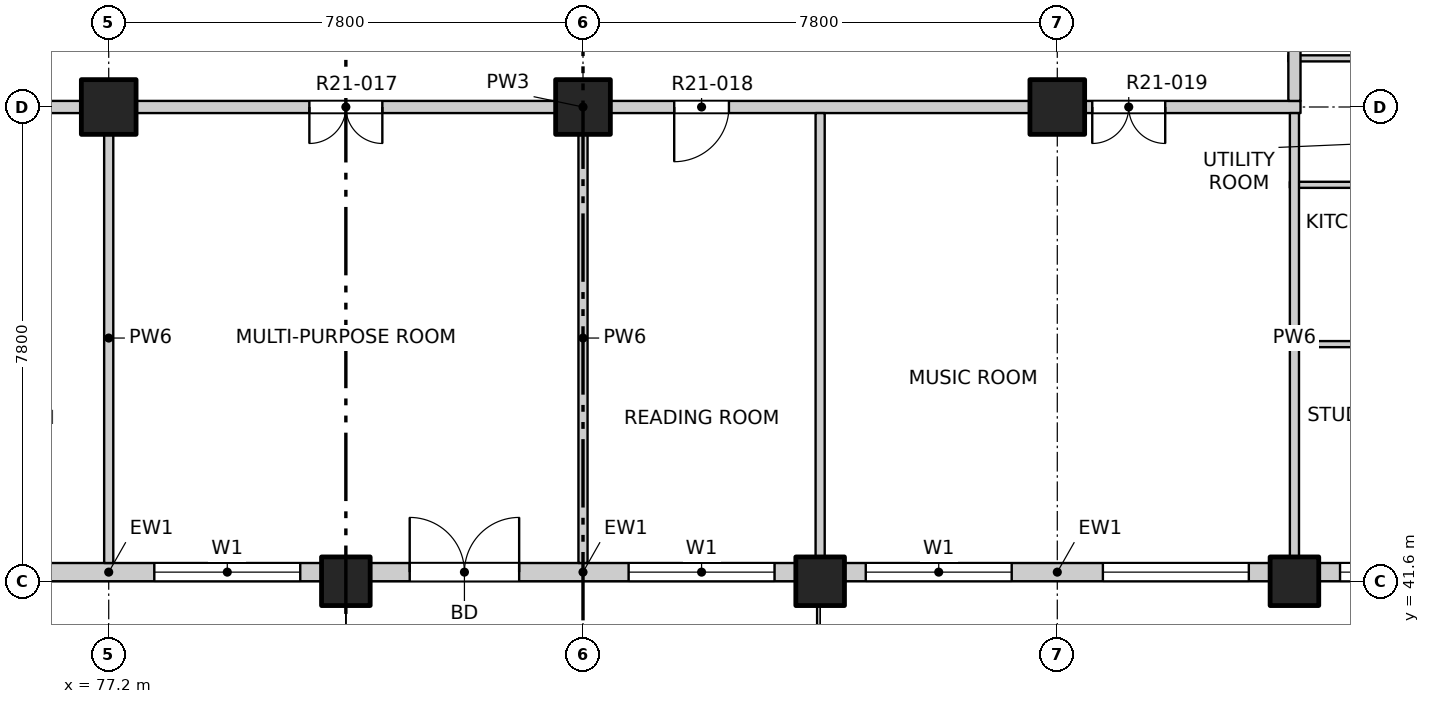
"""IFC4 building model, lengths in metres.
Left out: names, types, materials, properties, quantities, classifications, styles, units other than length and angle.
Written with IfcOpenShell. Run it as: python <this file> out.ifc"""

import sys

from ifc_helpers import new_model, si_unit, direction, frame, frame_2d, origin, origin_2d, place, context, subcontext, project, spatial, rectangle, extrude, element, fill, save


model = new_model("IFC4")
c1 = context("Model", 3, precision=1e-05, world=origin(), true_north=direction((0.0, 1.0)))
c2 = subcontext(c1, "Body", "Model", "MODEL_VIEW")
j1 = project(units=[si_unit("LENGTHUNIT", "METRE"), si_unit("PLANEANGLEUNIT", "RADIAN")], contexts=[c1])
p1 = place(None, origin())
s1 = spatial("IfcSite", under=j1, at=p1, CompositionType="ELEMENT")
p2 = place(p1, origin())
s2 = spatial("IfcBuilding", under=s1, at=p2, CompositionType="ELEMENT")
p3 = place(p2, frame((0.0, 0.0, 214.3)))
s3 = spatial("IfcBuildingStorey", under=s2, at=p3, CompositionType="ELEMENT", Elevation=214.3)
for number, where, z_axis, x_axis in (
    (1, (81.1, 41.6, -0.25), (0.0, 0.0, 1.0), (1.0, 0.0, 0.0)),
    (2, (88.9, 41.6, -0.25), (0.0, 0.0, 1.0), (1.0, 0.0, 0.0)),
    (3, (96.7, 41.6, -0.25), (0.0, 0.0, 1.0), (1.0, 0.0, 0.0)),
):
    element("IfcColumn", number, at=place(p3, frame(where, z_axis=z_axis, x_axis=x_axis)), inside=s3, PredefinedType="COLUMN", context=c2, shape_type="SweptSolid", body=[
        extrude(rectangle(XDim=0.8, YDim=0.8, at=origin_2d()), origin(), (0.0, 0.0, 1.0), 3.4),
    ])
for number, where, z_axis, x_axis in (
    (4, (77.2, 49.4, -0.25), (0.0, 0.0, 1.0), (1.0, 0.0, 0.0)),
    (5, (85.0, 49.4, -0.25), (0.0, 0.0, 1.0), (1.0, 0.0, 0.0)),
    (6, (92.8, 49.4, -0.25), (0.0, 0.0, 1.0), (1.0, 0.0, 0.0)),
):
    element("IfcColumn", number, at=place(p3, frame(where, z_axis=z_axis, x_axis=x_axis)), inside=s3, PredefinedType="COLUMN", context=c2, shape_type="SweptSolid", body=[
        extrude(rectangle(XDim=0.9, YDim=0.9, at=origin_2d()), origin(), (0.0, 0.0, 1.0), 3.4),
    ])
p4 = place(p3, frame((73.7, 41.75, 0.0), z_axis=(0.0, 0.0, 1.0), x_axis=(1.0, 0.0, 0.0)))
e7 = element("IfcWall", 7, at=p4, inside=s3, PredefinedType="SOLIDWALL", context=c2, shape_type="SweptSolid", body=[
    extrude(rectangle(XDim=7.0, YDim=0.3, at=frame_2d((3.5, 0.0))), origin(), (0.0, 0.0, 1.0), 2.7),
])
p5 = place(p4, frame((0.65, 0.0, 0.0)))
e8 = element("IfcOpeningElement", 8, at=p5, cuts=e7, PredefinedType="OPENING", context=c2, shape_type="SweptSolid", body=[
    extrude(rectangle(XDim=1.8, YDim=2.4, at=frame_2d((0.9, 1.2))), frame((0.0, 0.16, 0.0), z_axis=(0.0, -1.0, 0.0), x_axis=(1.0, 0.0, 0.0)), (0.0, 0.0, 1.0), 0.32),
])
p6 = place(p4, frame((4.25, 0.0, 0.9)))
e9 = element("IfcOpeningElement", 9, at=p6, cuts=e7, PredefinedType="OPENING", context=c2, shape_type="SweptSolid", body=[
    extrude(rectangle(XDim=2.4, YDim=1.8, at=frame_2d((1.2, 0.9))), frame((0.0, 0.16, 0.0), z_axis=(0.0, -1.0, 0.0), x_axis=(1.0, 0.0, 0.0)), (0.0, 0.0, 1.0), 0.32),
])
p7 = place(p3, frame((81.5, 41.75, 0.0), z_axis=(0.0, 0.0, 1.0), x_axis=(1.0, 0.0, 0.0)))
e10 = element("IfcWall", 10, at=p7, inside=s3, PredefinedType="SOLIDWALL", context=c2, shape_type="SweptSolid", body=[
    extrude(rectangle(XDim=7.0, YDim=0.3, at=frame_2d((3.5, 0.0))), origin(), (0.0, 0.0, 1.0), 2.7),
])
p8 = place(p7, frame((0.65, 0.0, 0.0)))
e11 = element("IfcOpeningElement", 11, at=p8, cuts=e10, PredefinedType="OPENING", context=c2, shape_type="SweptSolid", body=[
    extrude(rectangle(XDim=1.8, YDim=2.4, at=frame_2d((0.9, 1.2))), frame((0.0, 0.16, 0.0), z_axis=(0.0, -1.0, 0.0), x_axis=(1.0, 0.0, 0.0)), (0.0, 0.0, 1.0), 0.32),
])
p9 = place(p7, frame((4.25, 0.0, 0.9)))
e12 = element("IfcOpeningElement", 12, at=p9, cuts=e10, PredefinedType="OPENING", context=c2, shape_type="SweptSolid", body=[
    extrude(rectangle(XDim=2.4, YDim=1.8, at=frame_2d((1.2, 0.9))), frame((0.0, 0.16, 0.0), z_axis=(0.0, -1.0, 0.0), x_axis=(1.0, 0.0, 0.0)), (0.0, 0.0, 1.0), 0.32),
])
p10 = place(p3, frame((89.3, 41.75, 0.0), z_axis=(0.0, 0.0, 1.0), x_axis=(1.0, 0.0, 0.0)))
e13 = element("IfcWall", 13, at=p10, inside=s3, PredefinedType="SOLIDWALL", context=c2, shape_type="SweptSolid", body=[
    extrude(rectangle(XDim=7.0, YDim=0.3, at=frame_2d((3.5, 0.0))), origin(), (0.0, 0.0, 1.0), 2.7),
])
p11 = place(p10, frame((0.35, 0.0, 0.9)))
e14 = element("IfcOpeningElement", 14, at=p11, cuts=e13, PredefinedType="OPENING", context=c2, shape_type="SweptSolid", body=[
    extrude(rectangle(XDim=2.4, YDim=1.8, at=frame_2d((1.2, 0.9))), frame((0.0, 0.16, 0.0), z_axis=(0.0, -1.0, 0.0), x_axis=(1.0, 0.0, 0.0)), (0.0, 0.0, 1.0), 0.32),
])
p12 = place(p10, frame((4.25, 0.0, 0.9)))
e15 = element("IfcOpeningElement", 15, at=p12, cuts=e13, PredefinedType="OPENING", context=c2, shape_type="SweptSolid", body=[
    extrude(rectangle(XDim=2.4, YDim=1.8, at=frame_2d((1.2, 0.9))), frame((0.0, 0.16, 0.0), z_axis=(0.0, -1.0, 0.0), x_axis=(1.0, 0.0, 0.0)), (0.0, 0.0, 1.0), 0.32),
])
p13 = place(p3, frame((97.1, 41.75, 0.0), z_axis=(0.0, 0.0, 1.0), x_axis=(1.0, 0.0, 0.0)))
e16 = element("IfcWall", 16, at=p13, inside=s3, PredefinedType="SOLIDWALL", context=c2, shape_type="SweptSolid", body=[
    extrude(rectangle(XDim=7.4, YDim=0.3, at=frame_2d((3.7, 0.0))), origin(), (0.0, 0.0, 1.0), 2.7),
])
p14 = place(p13, frame((0.35, 0.0, 0.9)))
e17 = element("IfcOpeningElement", 17, at=p14, cuts=e16, PredefinedType="OPENING", context=c2, shape_type="SweptSolid", body=[
    extrude(rectangle(XDim=2.4, YDim=1.8, at=frame_2d((1.2, 0.9))), frame((0.0, 0.16, 0.0), z_axis=(0.0, -1.0, 0.0), x_axis=(1.0, 0.0, 0.0)), (0.0, 0.0, 1.0), 0.32),
])
p15 = place(p13, frame((4.25, 0.0, 0.9)))
e18 = element("IfcOpeningElement", 18, at=p15, cuts=e16, PredefinedType="OPENING", context=c2, shape_type="SweptSolid", body=[
    extrude(rectangle(XDim=2.4, YDim=1.8, at=frame_2d((1.2, 0.9))), frame((0.0, 0.16, 0.0), z_axis=(0.0, -1.0, 0.0), x_axis=(1.0, 0.0, 0.0)), (0.0, 0.0, 1.0), 0.32),
])
p16 = place(p3, frame((96.625, 45.5, 0.0), z_axis=(0.0, 0.0, 1.0), x_axis=(1.0, 0.0, 0.0)))
e19 = element("IfcWall", 19, at=p16, inside=s3, PredefinedType="PARTITIONING", context=c2, shape_type="SweptSolid", body=[
    extrude(rectangle(XDim=11.475, YDim=0.1, at=frame_2d((5.738, 0.0))), origin(), (0.0, 0.0, 1.0), 3.15),
])
p17 = place(p16, frame((2.61, 0.0, 0.0)))
e20 = element("IfcOpeningElement", 20, at=p17, cuts=e19, PredefinedType="OPENING", context=c2, shape_type="SweptSolid", body=[
    extrude(rectangle(XDim=0.9, YDim=2.1, at=frame_2d((0.45, 1.05))), frame((0.0, 0.06, 0.0), z_axis=(0.0, -1.0, 0.0), x_axis=(1.0, 0.0, 0.0)), (0.0, 0.0, 1.0), 0.12),
])
p18 = place(p3, frame((96.625, 48.12, 0.0), z_axis=(0.0, 0.0, 1.0), x_axis=(1.0, 0.0, 0.0)))
e21 = element("IfcWall", 21, at=p18, inside=s3, PredefinedType="PARTITIONING", context=c2, shape_type="SweptSolid", body=[
    extrude(rectangle(XDim=2.195, YDim=0.1, at=frame_2d((1.098, 0.0))), origin(), (0.0, 0.0, 1.0), 3.15),
])
p19 = place(p3, frame((73.2, 49.4, 0.0), z_axis=(0.0, 0.0, 1.0), x_axis=(1.0, 0.0, 0.0)))
e22 = element("IfcWall", 22, at=p19, inside=s3, PredefinedType="PARTITIONING", context=c2, shape_type="SweptSolid", body=[
    extrude(rectangle(XDim=23.6, YDim=0.2, at=frame_2d((11.8, 0.0))), origin(), (0.0, 0.0, 1.0), 3.15),
])
p20 = place(p19, frame((1.6, 0.0, 0.0)))
e23 = element("IfcOpeningElement", 23, at=p20, cuts=e22, PredefinedType="OPENING", context=c2, shape_type="SweptSolid", body=[
    extrude(rectangle(XDim=0.9, YDim=2.1, at=frame_2d((0.45, 1.05))), frame((0.0, 0.11, 0.0), z_axis=(0.0, -1.0, 0.0), x_axis=(1.0, 0.0, 0.0)), (0.0, 0.0, 1.0), 0.22),
])
p21 = place(p19, frame((7.3, 0.0, 0.0)))
e24 = element("IfcOpeningElement", 24, at=p21, cuts=e22, PredefinedType="OPENING", context=c2, shape_type="SweptSolid", body=[
    extrude(rectangle(XDim=1.2, YDim=2.1, at=frame_2d((0.6, 1.05))), frame((0.0, 0.11, 0.0), z_axis=(0.0, -1.0, 0.0), x_axis=(1.0, 0.0, 0.0)), (0.0, 0.0, 1.0), 0.22),
])
p22 = place(p19, frame((13.3, 0.0, 0.0)))
e25 = element("IfcOpeningElement", 25, at=p22, cuts=e22, PredefinedType="OPENING", context=c2, shape_type="SweptSolid", body=[
    extrude(rectangle(XDim=0.9, YDim=2.1, at=frame_2d((0.45, 1.05))), frame((0.0, 0.11, 0.0), z_axis=(0.0, -1.0, 0.0), x_axis=(1.0, 0.0, 0.0)), (0.0, 0.0, 1.0), 0.22),
])
p23 = place(p19, frame((20.175, 0.0, 0.0)))
e26 = element("IfcOpeningElement", 26, at=p23, cuts=e22, PredefinedType="OPENING", context=c2, shape_type="SweptSolid", body=[
    extrude(rectangle(XDim=1.2, YDim=2.1, at=frame_2d((0.6, 1.05))), frame((0.0, 0.11, 0.0), z_axis=(0.0, -1.0, 0.0), x_axis=(1.0, 0.0, 0.0)), (0.0, 0.0, 1.0), 0.22),
])
p24 = place(p3, frame((96.6, 50.2, 0.0), z_axis=(0.0, 0.0, 1.0), x_axis=(1.0, 0.0, 0.0)))
e27 = element("IfcWall", 27, at=p24, inside=s3, PredefinedType="PARTITIONING", context=c2, shape_type="SweptSolid", body=[
    extrude(rectangle(XDim=2.22, YDim=0.1, at=frame_2d((1.11, 0.0))), origin(), (0.0, 0.0, 1.0), 3.15),
])
for number, where, z_axis, x_axis in (
    (28, (77.2, 41.9, 0.0), (0.0, 0.0, 1.0), (0.0, 1.0, 0.0)),
    (29, (85.0, 41.9, 0.0), (0.0, 0.0, 1.0), (0.0, 1.0, 0.0)),
):
    element("IfcWall", number, at=place(p3, frame(where, z_axis=z_axis, x_axis=x_axis)), inside=s3, PredefinedType="PARTITIONING", context=c2, shape_type="SweptSolid", body=[
        extrude(rectangle(XDim=7.4, YDim=0.15, at=frame_2d((3.7, 0.0))), origin(), (0.0, 0.0, 1.0), 3.15),
    ])
p25 = place(p3, frame((88.9, 41.9, 0.0), z_axis=(0.0, 0.0, 1.0), x_axis=(0.0, 1.0, 0.0)))
e30 = element("IfcWall", 30, at=p25, inside=s3, PredefinedType="PARTITIONING", context=c2, shape_type="SweptSolid", body=[
    extrude(rectangle(XDim=7.4, YDim=0.15, at=frame_2d((3.7, 0.0))), origin(), (0.0, 0.0, 1.0), 2.55),
])
p26 = place(p3, frame((96.7, 41.9, 0.0), z_axis=(0.0, 0.0, 1.0), x_axis=(0.0, 1.0, 0.0)))
e31 = element("IfcWall", 31, at=p26, inside=s3, PredefinedType="PARTITIONING", context=c2, shape_type="SweptSolid", body=[
    extrude(rectangle(XDim=7.4, YDim=0.15, at=frame_2d((3.7, 0.0))), origin(), (0.0, 0.0, 1.0), 3.15),
])
p27 = place(p3, frame((96.7, 49.5, 0.0), z_axis=(0.0, 0.0, 1.0), x_axis=(0.0, 1.0, 0.0)))
e32 = element("IfcWall", 32, at=p27, inside=s3, PredefinedType="PARTITIONING", context=c2, shape_type="SweptSolid", body=[
    extrude(rectangle(XDim=34.9, YDim=0.2, at=frame_2d((17.45, 0.0))), origin(), (0.0, 0.0, 1.0), 3.15),
])
p28 = place(p27, frame((3.275, 0.0, 0.0)))
e33 = element("IfcOpeningElement", 33, at=p28, cuts=e32, PredefinedType="OPENING", context=c2, shape_type="SweptSolid", body=[
    extrude(rectangle(XDim=1.0, YDim=2.1, at=frame_2d((0.5, 1.05))), frame((0.0, 0.11, 0.0), z_axis=(0.0, -1.0, 0.0), x_axis=(1.0, 0.0, 0.0)), (0.0, 0.0, 1.0), 0.22),
])
p29 = place(p27, frame((10.825, 0.0, 0.0)))
e34 = element("IfcOpeningElement", 34, at=p29, cuts=e32, PredefinedType="OPENING", context=c2, shape_type="SweptSolid", body=[
    extrude(rectangle(XDim=1.0, YDim=2.1, at=frame_2d((0.5, 1.05))), frame((0.0, 0.11, 0.0), z_axis=(0.0, -1.0, 0.0), x_axis=(1.0, 0.0, 0.0)), (0.0, 0.0, 1.0), 0.22),
])
p30 = place(p27, frame((21.575, 0.0, 0.0)))
e35 = element("IfcOpeningElement", 35, at=p30, cuts=e32, PredefinedType="OPENING", context=c2, shape_type="SweptSolid", body=[
    extrude(rectangle(XDim=1.0, YDim=2.1, at=frame_2d((0.5, 1.05))), frame((0.0, 0.11, 0.0), z_axis=(0.0, -1.0, 0.0), x_axis=(1.0, 0.0, 0.0)), (0.0, 0.0, 1.0), 0.22),
])
p31 = place(p27, frame((30.575, 0.0, 0.0)))
e36 = element("IfcOpeningElement", 36, at=p31, cuts=e32, PredefinedType="OPENING", context=c2, shape_type="SweptSolid", body=[
    extrude(rectangle(XDim=1.0, YDim=2.1, at=frame_2d((0.5, 1.05))), frame((0.0, 0.11, 0.0), z_axis=(0.0, -1.0, 0.0), x_axis=(1.0, 0.0, 0.0)), (0.0, 0.0, 1.0), 0.22),
])
p32 = place(p6, origin())
e37 = element("IfcWindow", 37, at=p32, inside=s3, PartitioningType="DOUBLE_PANEL_VERTICAL", PredefinedType="WINDOW", context=c2, shape_type="SweptSolid", body=[
    extrude(rectangle(XDim=2.4, YDim=1.8, at=frame_2d((1.2, 0.9))), frame((0.0, 0.03, 0.0), z_axis=(0.0, -1.0, 0.0), x_axis=(1.0, 0.0, 0.0)), (0.0, 0.0, 1.0), 0.06),
])
fill(e9, e37)
p33 = place(p8, origin())
e38 = element("IfcDoor", 38, at=p33, inside=s3, OperationType="DOUBLE_DOOR_SINGLE_SWING", PredefinedType="DOOR", context=c2, shape_type="SweptSolid", body=[
    extrude(rectangle(XDim=1.8, YDim=2.4, at=frame_2d((0.9, 1.2))), frame((0.0, 0.025, 0.0), z_axis=(0.0, -1.0, 0.0), x_axis=(1.0, 0.0, 0.0)), (0.0, 0.0, 1.0), 0.05),
])
fill(e11, e38)
p34 = place(p9, origin())
e39 = element("IfcWindow", 39, at=p34, inside=s3, PartitioningType="DOUBLE_PANEL_VERTICAL", PredefinedType="WINDOW", context=c2, shape_type="SweptSolid", body=[
    extrude(rectangle(XDim=2.4, YDim=1.8, at=frame_2d((1.2, 0.9))), frame((0.0, 0.03, 0.0), z_axis=(0.0, -1.0, 0.0), x_axis=(1.0, 0.0, 0.0)), (0.0, 0.0, 1.0), 0.06),
])
fill(e12, e39)
p35 = place(p11, origin())
e40 = element("IfcWindow", 40, at=p35, inside=s3, PartitioningType="DOUBLE_PANEL_VERTICAL", PredefinedType="WINDOW", context=c2, shape_type="SweptSolid", body=[
    extrude(rectangle(XDim=2.4, YDim=1.8, at=frame_2d((1.2, 0.9))), frame((0.0, 0.03, 0.0), z_axis=(0.0, -1.0, 0.0), x_axis=(1.0, 0.0, 0.0)), (0.0, 0.0, 1.0), 0.06),
])
fill(e14, e40)
p36 = place(p12, origin())
e41 = element("IfcWindow", 41, at=p36, inside=s3, PartitioningType="DOUBLE_PANEL_VERTICAL", PredefinedType="WINDOW", context=c2, shape_type="SweptSolid", body=[
    extrude(rectangle(XDim=2.4, YDim=1.8, at=frame_2d((1.2, 0.9))), frame((0.0, 0.03, 0.0), z_axis=(0.0, -1.0, 0.0), x_axis=(1.0, 0.0, 0.0)), (0.0, 0.0, 1.0), 0.06),
])
fill(e15, e41)
p37 = place(p14, origin())
e42 = element("IfcWindow", 42, at=p37, inside=s3, PartitioningType="DOUBLE_PANEL_VERTICAL", PredefinedType="WINDOW", context=c2, shape_type="SweptSolid", body=[
    extrude(rectangle(XDim=2.4, YDim=1.8, at=frame_2d((1.2, 0.9))), frame((0.0, 0.03, 0.0), z_axis=(0.0, -1.0, 0.0), x_axis=(1.0, 0.0, 0.0)), (0.0, 0.0, 1.0), 0.06),
])
fill(e17, e42)
p38 = place(p21, origin())
e43 = element("IfcDoor", 43, at=p38, inside=s3, OperationType="DOUBLE_DOOR_SINGLE_SWING", PredefinedType="DOOR", context=c2, shape_type="SweptSolid", body=[
    extrude(rectangle(XDim=1.2, YDim=2.1, at=frame_2d((0.6, 1.05))), frame((0.0, 0.025, 0.0), z_axis=(0.0, -1.0, 0.0), x_axis=(1.0, 0.0, 0.0)), (0.0, 0.0, 1.0), 0.05),
])
fill(e24, e43)
p39 = place(p22, origin())
e44 = element("IfcDoor", 44, at=p39, inside=s3, OperationType="SINGLE_SWING_RIGHT", PredefinedType="DOOR", context=c2, shape_type="SweptSolid", body=[
    extrude(rectangle(XDim=0.9, YDim=2.1, at=frame_2d((0.45, 1.05))), frame((0.0, 0.025, 0.0), z_axis=(0.0, -1.0, 0.0), x_axis=(1.0, 0.0, 0.0)), (0.0, 0.0, 1.0), 0.05),
])
fill(e25, e44)
p40 = place(p23, origin())
e45 = element("IfcDoor", 45, at=p40, inside=s3, OperationType="DOUBLE_DOOR_SINGLE_SWING", PredefinedType="DOOR", context=c2, shape_type="SweptSolid", body=[
    extrude(rectangle(XDim=1.2, YDim=2.1, at=frame_2d((0.6, 1.05))), frame((0.0, 0.025, 0.0), z_axis=(0.0, -1.0, 0.0), x_axis=(1.0, 0.0, 0.0)), (0.0, 0.0, 1.0), 0.05),
])
fill(e26, e45)
save(model, sys.argv[1])
